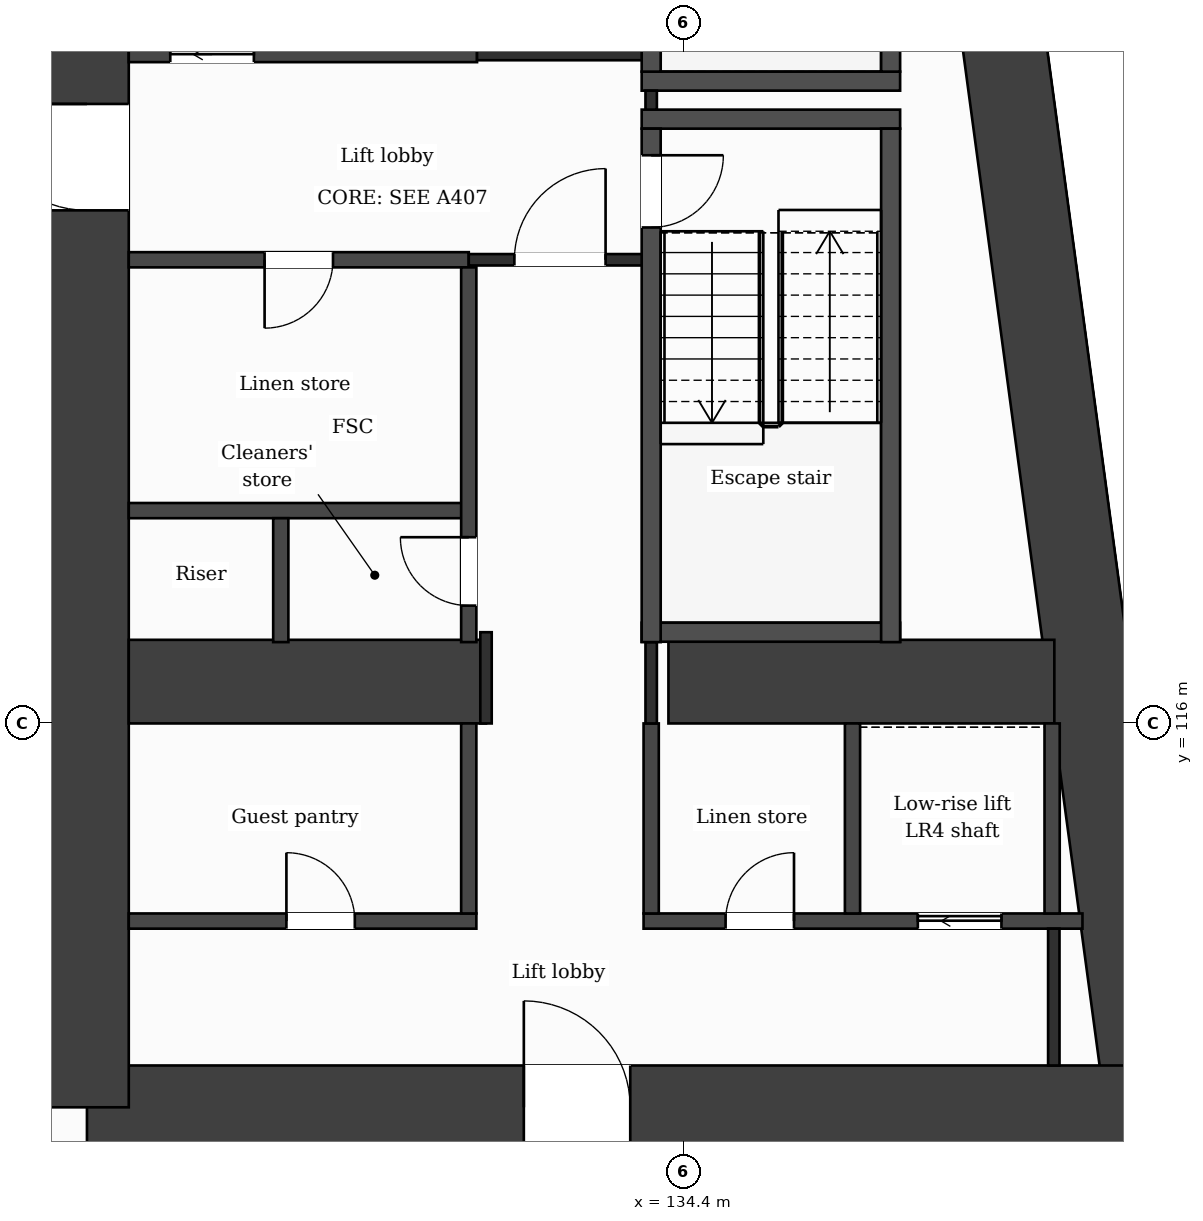
"""IFC4 building model, lengths in metres.
Left out: names, types, materials, properties, quantities, classifications, styles, units other than length and angle.
Written with IfcOpenShell. Run it as: python <this file> out.ifc"""

import sys

from ifc_helpers import new_model, si_unit, direction, frame, frame_2d, origin, place, context, subcontext, project, spatial, rectangle, extrude, element, fill, save


model = new_model("IFC4")
c1 = context("Model", 3, precision=1e-05, world=origin(), true_north=direction((0.0, 1.0)))
c2 = subcontext(c1, "Body", "Model", "MODEL_VIEW")
j1 = project(units=[si_unit("LENGTHUNIT", "METRE"), si_unit("PLANEANGLEUNIT", "RADIAN")], contexts=[c1])
p1 = place(None, origin())
s1 = spatial("IfcSite", under=j1, at=p1, CompositionType="ELEMENT")
p2 = place(p1, origin())
s2 = spatial("IfcBuilding", under=s1, at=p2, CompositionType="ELEMENT")
p3 = place(p2, frame((0.0, 0.0, 39.0)))
s3 = spatial("IfcBuildingStorey", under=s2, at=p3, CompositionType="ELEMENT", Elevation=39.0)
p4 = place(p3, frame((137.688, 131.85, 0.0), z_axis=(0.0, 0.0, 1.0), x_axis=(0.133411793472, -0.991060691059, 0.0)))
e1 = element("IfcWall", 1, at=p4, inside=s3, PredefinedType="SHEAR", context=c2, shape_type="SweptSolid", body=[
    extrude(rectangle(XDim=21.089, YDim=1.1, at=frame_2d((10.544, 0.0))), origin(), (0.0, 0.0, 1.0), 3.5),
])
p5 = place(p3, frame((140.502, 110.95, 0.0), z_axis=(0.0, 0.0, 1.0), x_axis=(-1.0, 0.0, 0.0)))
e2 = element("IfcWall", 2, at=p5, inside=s3, PredefinedType="SHEAR", context=c2, shape_type="SweptSolid", body=[
    extrude(rectangle(XDim=13.952, YDim=1.1, at=frame_2d((6.976, 0.0))), origin(), (0.0, 0.0, 1.0), 3.5),
])
p6 = place(p5, frame((6.804, 0.0, 0.0)))
e3 = element("IfcOpeningElement", 3, at=p6, cuts=e2, PredefinedType="OPENING", context=c2, shape_type="SweptSolid", body=[
    extrude(rectangle(XDim=1.4, YDim=2.1, at=frame_2d((0.7, 1.05))), frame((0.0, 0.56, 0.0), z_axis=(0.0, -1.0, 0.0), x_axis=(1.0, 0.0, 0.0)), (0.0, 0.0, 1.0), 1.12),
])
p7 = place(p3, frame((126.55, 110.95, 0.0), z_axis=(0.0, 0.0, 1.0), x_axis=(0.0, 1.0, 0.0)))
e4 = element("IfcWall", 4, at=p7, inside=s3, PredefinedType="SHEAR", context=c2, shape_type="SweptSolid", body=[
    extrude(rectangle(XDim=20.9, YDim=1.1, at=frame_2d((10.45, 0.0))), origin(), (0.0, 0.0, 1.0), 3.5),
])
p8 = place(p7, frame((11.8, 0.0, 0.0)))
e5 = element("IfcOpeningElement", 5, at=p8, cuts=e4, PredefinedType="OPENING", context=c2, shape_type="SweptSolid", body=[
    extrude(rectangle(XDim=1.4, YDim=2.1, at=frame_2d((0.7, 1.05))), frame((0.0, 0.56, 0.0), z_axis=(0.0, -1.0, 0.0), x_axis=(1.0, 0.0, 0.0)), (0.0, 0.0, 1.0), 1.12),
])
p9 = place(p3, frame((127.1, 116.55, 0.0), z_axis=(0.0, 0.0, 1.0), x_axis=(1.0, 0.0, 0.0)))
e6 = element("IfcWall", 6, at=p9, inside=s3, PredefinedType="SHEAR", context=c2, shape_type="SweptSolid", body=[
    extrude(rectangle(XDim=4.7, YDim=1.1, at=frame_2d((2.35, 0.0))), origin(), (0.0, 0.0, 1.0), 3.5),
])
p10 = place(p3, frame((134.2, 116.55, 0.0), z_axis=(0.0, 0.0, 1.0), x_axis=(1.0, 0.0, 0.0)))
e7 = element("IfcWall", 7, at=p10, inside=s3, PredefinedType="SHEAR", context=c2, shape_type="SweptSolid", body=[
    extrude(rectangle(XDim=5.077, YDim=1.1, at=frame_2d((2.539, 0.0))), origin(), (0.0, 0.0, 1.0), 3.5),
])
p11 = place(p3, frame((127.1, 113.4, 0.0), z_axis=(0.0, 0.0, 1.0), x_axis=(1.0, 0.0, 0.0)))
e8 = element("IfcWall", 8, at=p11, inside=s3, PredefinedType="PARTITIONING", context=c2, shape_type="SweptSolid", body=[
    extrude(rectangle(XDim=4.573, YDim=0.2, at=frame_2d((2.287, 0.0))), origin(), (0.0, 0.0, 1.0), 3.18),
])
p12 = place(p11, frame((2.074, 0.0, 0.0)))
e9 = element("IfcOpeningElement", 9, at=p12, cuts=e8, PredefinedType="OPENING", context=c2, shape_type="SweptSolid", body=[
    extrude(rectangle(XDim=0.9, YDim=2.1, at=frame_2d((0.45, 1.05))), frame((0.0, 0.11, 0.0), z_axis=(0.0, -1.0, 0.0), x_axis=(1.0, 0.0, 0.0)), (0.0, 0.0, 1.0), 0.22),
])
p13 = place(p3, frame((133.873, 113.4, 0.0), z_axis=(0.0, 0.0, 1.0), x_axis=(1.0, 0.0, 0.0)))
e10 = element("IfcWall", 10, at=p13, inside=s3, PredefinedType="PARTITIONING", context=c2, shape_type="SweptSolid", body=[
    extrude(rectangle(XDim=5.774, YDim=0.2, at=frame_2d((2.887, 0.0))), origin(), (0.0, 0.0, 1.0), 3.18),
])
p14 = place(p13, frame((3.608, 0.0, 0.0)))
e11 = element("IfcOpeningElement", 11, at=p14, cuts=e10, PredefinedType="OPENING", context=c2, shape_type="SweptSolid", body=[
    extrude(rectangle(XDim=1.1, YDim=2.1, at=frame_2d((0.55, 1.05))), frame((0.0, 0.11, 0.0), z_axis=(0.0, -1.0, 0.0), x_axis=(1.0, 0.0, 0.0)), (0.0, 0.0, 1.0), 0.22),
])
p15 = place(p13, frame((1.079, 0.0, 0.0)))
e12 = element("IfcOpeningElement", 12, at=p15, cuts=e10, PredefinedType="OPENING", context=c2, shape_type="SweptSolid", body=[
    extrude(rectangle(XDim=0.9, YDim=2.1, at=frame_2d((0.45, 1.05))), frame((0.0, 0.11, 0.0), z_axis=(0.0, -1.0, 0.0), x_axis=(1.0, 0.0, 0.0)), (0.0, 0.0, 1.0), 0.22),
])
p16 = place(p3, frame((133.848, 117.2, 0.0), z_axis=(0.0, 0.0, 1.0), x_axis=(1.0, 0.0, 0.0)))
e13 = element("IfcWall", 13, at=p16, inside=s3, PredefinedType="PARTITIONING", context=c2, shape_type="SweptSolid", body=[
    extrude(rectangle(XDim=3.4, YDim=0.25, at=frame_2d((1.7, 0.0))), origin(), (0.0, 0.0, 1.0), 3.18),
])
p17 = place(p3, frame((127.1, 118.8, 0.0), z_axis=(0.0, 0.0, 1.0), x_axis=(1.0, 0.0, 0.0)))
e14 = element("IfcWall", 14, at=p17, inside=s3, PredefinedType="PARTITIONING", context=c2, shape_type="SweptSolid", body=[
    extrude(rectangle(XDim=4.473, YDim=0.2, at=frame_2d((2.236, 0.0))), origin(), (0.0, 0.0, 1.0), 3.18),
])
p18 = place(p3, frame((127.1, 122.1, 0.0), z_axis=(0.0, 0.0, 1.0), x_axis=(1.0, 0.0, 0.0)))
e15 = element("IfcWall", 15, at=p18, inside=s3, PredefinedType="PARTITIONING", context=c2, shape_type="SweptSolid", body=[
    extrude(rectangle(XDim=4.473, YDim=0.2, at=frame_2d((2.236, 0.0))), origin(), (0.0, 0.0, 1.0), 3.18),
])
p19 = place(p18, frame((1.787, 0.0, 0.0)))
e16 = element("IfcOpeningElement", 16, at=p19, cuts=e15, PredefinedType="OPENING", context=c2, shape_type="SweptSolid", body=[
    extrude(rectangle(XDim=0.9, YDim=2.1, at=frame_2d((0.45, 1.05))), frame((0.0, 0.11, 0.0), z_axis=(0.0, -1.0, 0.0), x_axis=(1.0, 0.0, 0.0)), (0.0, 0.0, 1.0), 0.22),
])
p20 = place(p3, frame((131.573, 122.1, 0.0), z_axis=(0.0, 0.0, 1.0), x_axis=(1.0, 0.0, 0.0)))
e17 = element("IfcWall", 17, at=p20, inside=s3, PredefinedType="PARTITIONING", context=c2, shape_type="SweptSolid", body=[
    extrude(rectangle(XDim=2.4, YDim=0.15, at=frame_2d((1.2, 0.0))), origin(), (0.0, 0.0, 1.0), 3.18),
])
p21 = place(p20, frame((0.6, 0.0, 0.0)))
e18 = element("IfcOpeningElement", 18, at=p21, cuts=e17, PredefinedType="OPENING", context=c2, shape_type="SweptSolid", body=[
    extrude(rectangle(XDim=1.2, YDim=2.1, at=frame_2d((0.6, 1.05))), frame((0.0, 0.085, 0.0), z_axis=(0.0, -1.0, 0.0), x_axis=(1.0, 0.0, 0.0)), (0.0, 0.0, 1.0), 0.17),
])
for number, where, z_axis, x_axis in (
    (19, (133.848, 123.95, 0.0), (0.0, 0.0, 1.0), (1.0, 0.0, 0.0)),
    (20, (133.848, 124.45, 0.0), (0.0, 0.0, 1.0), (1.0, 0.0, 0.0)),
):
    element("IfcWall", number, at=place(p3, frame(where, z_axis=z_axis, x_axis=x_axis)), inside=s3, PredefinedType="PARTITIONING", context=c2, shape_type="SweptSolid", body=[
        extrude(rectangle(XDim=3.4, YDim=0.25, at=frame_2d((1.7, 0.0))), origin(), (0.0, 0.0, 1.0), 3.18),
    ])
p22 = place(p3, frame((127.1, 124.8, 0.0), z_axis=(0.0, 0.0, 1.0), x_axis=(1.0, 0.0, 0.0)))
e21 = element("IfcWall", 21, at=p22, inside=s3, PredefinedType="PARTITIONING", context=c2, shape_type="SweptSolid", body=[
    extrude(rectangle(XDim=4.582, YDim=0.2, at=frame_2d((2.291, 0.0))), origin(), (0.0, 0.0, 1.0), 3.18),
])
p23 = place(p22, frame((0.546, 0.0, 0.0)))
e22 = element("IfcOpeningElement", 22, at=p23, cuts=e21, PredefinedType="OPENING", context=c2, shape_type="SweptSolid", body=[
    extrude(rectangle(XDim=1.1, YDim=2.1, at=frame_2d((0.55, 1.05))), frame((0.0, 0.11, 0.0), z_axis=(0.0, -1.0, 0.0), x_axis=(1.0, 0.0, 0.0)), (0.0, 0.0, 1.0), 0.22),
])
p24 = place(p3, frame((131.682, 124.8, 0.0), z_axis=(0.0, 0.0, 1.0), x_axis=(1.0, 0.0, 0.0)))
e23 = element("IfcWall", 23, at=p24, inside=s3, PredefinedType="PARTITIONING", context=c2, shape_type="SweptSolid", body=[
    extrude(rectangle(XDim=2.416, YDim=0.15, at=frame_2d((1.208, 0.0))), origin(), (0.0, 0.0, 1.0), 3.18),
])
p25 = place(p3, frame((129.1, 117.07, 0.0), z_axis=(0.0, 0.0, 1.0), x_axis=(0.0, 1.0, 0.0)))
e24 = element("IfcWall", 24, at=p25, inside=s3, PredefinedType="PARTITIONING", context=c2, shape_type="SweptSolid", body=[
    extrude(rectangle(XDim=1.63, YDim=0.2, at=frame_2d((0.815, 0.0))), origin(), (0.0, 0.0, 1.0), 3.18),
])
p26 = place(p3, frame((131.573, 113.5, 0.0), z_axis=(0.0, 0.0, 1.0), x_axis=(0.0, 1.0, 0.0)))
e25 = element("IfcWall", 25, at=p26, inside=s3, PredefinedType="PARTITIONING", context=c2, shape_type="SweptSolid", body=[
    extrude(rectangle(XDim=2.5, YDim=0.2, at=frame_2d((1.25, 0.0))), origin(), (0.0, 0.0, 1.0), 3.18),
])
p27 = place(p3, frame((131.573, 117.07, 0.0), z_axis=(0.0, 0.0, 1.0), x_axis=(0.0, 1.0, 0.0)))
e26 = element("IfcWall", 26, at=p27, inside=s3, PredefinedType="PARTITIONING", context=c2, shape_type="SweptSolid", body=[
    extrude(rectangle(XDim=4.93, YDim=0.2, at=frame_2d((2.465, 0.0))), origin(), (0.0, 0.0, 1.0), 3.18),
])
p28 = place(p27, frame((0.48, 0.0, 0.0)))
e27 = element("IfcOpeningElement", 27, at=p28, cuts=e26, PredefinedType="OPENING", context=c2, shape_type="SweptSolid", body=[
    extrude(rectangle(XDim=0.9, YDim=2.1, at=frame_2d((0.45, 1.05))), frame((0.0, 0.11, 0.0), z_axis=(0.0, -1.0, 0.0), x_axis=(1.0, 0.0, 0.0)), (0.0, 0.0, 1.0), 0.22),
])
p29 = place(p3, frame((131.8, 116.0, 0.0), z_axis=(0.0, 0.0, 1.0), x_axis=(0.0, 1.0, 0.0)))
e28 = element("IfcWall", 28, at=p29, inside=s3, PredefinedType="PARTITIONING", context=c2, shape_type="SweptSolid", body=[
    extrude(rectangle(XDim=1.2, YDim=0.15, at=frame_2d((0.6, 0.0))), origin(), (0.0, 0.0, 1.0), 3.18),
])
p30 = place(p3, frame((133.973, 113.5, 0.0), z_axis=(0.0, 0.0, 1.0), x_axis=(0.0, 1.0, 0.0)))
e29 = element("IfcWall", 29, at=p30, inside=s3, PredefinedType="PARTITIONING", context=c2, shape_type="SweptSolid", body=[
    extrude(rectangle(XDim=2.5, YDim=0.2, at=frame_2d((1.25, 0.0))), origin(), (0.0, 0.0, 1.0), 3.18),
])
p31 = place(p3, frame((133.973, 116.0, 0.0), z_axis=(0.0, 0.0, 1.0), x_axis=(0.0, 1.0, 0.0)))
e30 = element("IfcWall", 30, at=p31, inside=s3, PredefinedType="PARTITIONING", context=c2, shape_type="SweptSolid", body=[
    extrude(rectangle(XDim=1.07, YDim=0.15, at=frame_2d((0.535, 0.0))), origin(), (0.0, 0.0, 1.0), 3.18),
])
p32 = place(p3, frame((133.973, 124.075, 0.0), z_axis=(0.0, 0.0, 1.0), x_axis=(0.0, 1.0, 0.0)))
e31 = element("IfcWall", 31, at=p32, inside=s3, PredefinedType="PARTITIONING", context=c2, shape_type="SweptSolid", body=[
    extrude(rectangle(XDim=0.25, YDim=0.15, at=frame_2d((0.125, 0.0))), origin(), (0.0, 0.0, 1.0), 3.18),
])
p33 = place(p3, frame((133.973, 117.07, 0.0), z_axis=(0.0, 0.0, 1.0), x_axis=(0.0, 1.0, 0.0)))
e32 = element("IfcWall", 32, at=p33, inside=s3, PredefinedType="PARTITIONING", context=c2, shape_type="SweptSolid", body=[
    extrude(rectangle(XDim=6.755, YDim=0.25, at=frame_2d((3.377, 0.0))), origin(), (0.0, 0.0, 1.0), 3.18),
])
p34 = place(p33, frame((5.455, 0.0, 0.0)))
e33 = element("IfcOpeningElement", 33, at=p34, cuts=e32, PredefinedType="OPENING", context=c2, shape_type="SweptSolid", body=[
    extrude(rectangle(XDim=0.95, YDim=2.1, at=frame_2d((0.475, 1.05))), frame((0.0, 0.135, 0.0), z_axis=(0.0, -1.0, 0.0), x_axis=(1.0, 0.0, 0.0)), (0.0, 0.0, 1.0), 0.27),
])
p35 = place(p3, frame((133.973, 124.575, 0.0), z_axis=(0.0, 0.0, 1.0), x_axis=(0.0, 1.0, 0.0)))
e34 = element("IfcWall", 34, at=p35, inside=s3, PredefinedType="PARTITIONING", context=c2, shape_type="SweptSolid", body=[
    extrude(rectangle(XDim=6.755, YDim=0.25, at=frame_2d((3.377, 0.0))), origin(), (0.0, 0.0, 1.0), 3.18),
])
p36 = place(p35, frame((5.325, 0.0, 0.0)))
e35 = element("IfcOpeningElement", 35, at=p36, cuts=e34, PredefinedType="OPENING", context=c2, shape_type="SweptSolid", body=[
    extrude(rectangle(XDim=1.0, YDim=2.1, at=frame_2d((0.5, 1.05))), frame((0.0, 0.135, 0.0), z_axis=(0.0, -1.0, 0.0), x_axis=(1.0, 0.0, 0.0)), (0.0, 0.0, 1.0), 0.27),
])
p37 = place(p3, frame((136.622, 113.5, 0.0), z_axis=(0.0, 0.0, 1.0), x_axis=(0.0, 1.0, 0.0)))
e36 = element("IfcWall", 36, at=p37, inside=s3, PredefinedType="PARTITIONING", context=c2, shape_type="SweptSolid", body=[
    extrude(rectangle(XDim=2.5, YDim=0.2, at=frame_2d((1.25, 0.0))), origin(), (0.0, 0.0, 1.0), 3.18),
])
p38 = place(p3, frame((137.123, 117.07, 0.0), z_axis=(0.0, 0.0, 1.0), x_axis=(0.0, 1.0, 0.0)))
e37 = element("IfcWall", 37, at=p38, inside=s3, PredefinedType="PARTITIONING", context=c2, shape_type="SweptSolid", body=[
    extrude(rectangle(XDim=6.755, YDim=0.25, at=frame_2d((3.377, 0.0))), origin(), (0.0, 0.0, 1.0), 3.18),
])
p39 = place(p3, frame((137.123, 124.575, 0.0), z_axis=(0.0, 0.0, 1.0), x_axis=(0.0, 1.0, 0.0)))
e38 = element("IfcWall", 38, at=p39, inside=s3, PredefinedType="PARTITIONING", context=c2, shape_type="SweptSolid", body=[
    extrude(rectangle(XDim=6.5, YDim=0.25, at=frame_2d((3.25, 0.0))), origin(), (0.0, 0.0, 1.0), 3.18),
])
p40 = place(p3, frame((139.248, 113.5, 0.0), z_axis=(0.0, 0.0, 1.0), x_axis=(0.0, 1.0, 0.0)))
e39 = element("IfcWall", 39, at=p40, inside=s3, PredefinedType="PARTITIONING", context=c2, shape_type="SweptSolid", body=[
    extrude(rectangle(XDim=2.5, YDim=0.2, at=frame_2d((1.25, 0.0))), origin(), (0.0, 0.0, 1.0), 3.18),
])
p41 = place(p3, frame((139.27, 111.5, 0.0), z_axis=(0.0, 0.0, 1.0), x_axis=(0.0, 1.0, 0.0)))
e40 = element("IfcWall", 40, at=p41, inside=s3, PredefinedType="PARTITIONING", context=c2, shape_type="SweptSolid", body=[
    extrude(rectangle(XDim=1.8, YDim=0.15, at=frame_2d((0.9, 0.0))), origin(), (0.0, 0.0, 1.0), 3.18),
])
p42 = place(p21, origin())
e41 = element("IfcDoor", 41, at=p42, inside=s3, OperationType="SINGLE_SWING_RIGHT", PredefinedType="DOOR", context=c2, shape_type="SweptSolid", body=[
    extrude(rectangle(XDim=1.2, YDim=2.1, at=frame_2d((0.6, 1.05))), frame((0.0, 0.025, 0.0), z_axis=(0.0, -1.0, 0.0), x_axis=(1.0, 0.0, 0.0)), (0.0, 0.0, 1.0), 0.05),
])
fill(e18, e41)
p43 = place(p23, origin())
e42 = element("IfcDoor", 42, at=p43, inside=s3, OperationType="SLIDING_TO_LEFT", PredefinedType="DOOR", context=c2, shape_type="SweptSolid", body=[
    extrude(rectangle(XDim=1.1, YDim=2.1, at=frame_2d((0.55, 1.05))), frame((0.0, 0.025, 0.0), z_axis=(0.0, -1.0, 0.0), x_axis=(1.0, 0.0, 0.0)), (0.0, 0.0, 1.0), 0.05),
])
fill(e22, e42)
p44 = place(p19, origin())
e43 = element("IfcDoor", 43, at=p44, inside=s3, OperationType="SINGLE_SWING_LEFT", PredefinedType="DOOR", context=c2, shape_type="SweptSolid", body=[
    extrude(rectangle(XDim=0.9, YDim=2.1, at=frame_2d((0.45, 1.05))), frame((0.0, 0.025, 0.0), z_axis=(0.0, -1.0, 0.0), x_axis=(1.0, 0.0, 0.0)), (0.0, 0.0, 1.0), 0.05),
])
fill(e16, e43)
p45 = place(p34, origin())
e44 = element("IfcDoor", 44, at=p45, inside=s3, OperationType="SINGLE_SWING_RIGHT", PredefinedType="DOOR", context=c2, shape_type="SweptSolid", body=[
    extrude(rectangle(XDim=0.95, YDim=2.1, at=frame_2d((0.475, 1.05))), frame((0.0, 0.025, 0.0), z_axis=(0.0, -1.0, 0.0), x_axis=(1.0, 0.0, 0.0)), (0.0, 0.0, 1.0), 0.05),
])
fill(e33, e44)
p46 = place(p28, origin())
e45 = element("IfcDoor", 45, at=p46, inside=s3, OperationType="SINGLE_SWING_RIGHT", PredefinedType="DOOR", context=c2, shape_type="SweptSolid", body=[
    extrude(rectangle(XDim=0.9, YDim=2.1, at=frame_2d((0.45, 1.05))), frame((0.0, 0.025, 0.0), z_axis=(0.0, -1.0, 0.0), x_axis=(1.0, 0.0, 0.0)), (0.0, 0.0, 1.0), 0.05),
])
fill(e27, e45)
p47 = place(p14, origin())
e46 = element("IfcDoor", 46, at=p47, inside=s3, OperationType="SLIDING_TO_LEFT", PredefinedType="DOOR", context=c2, shape_type="SweptSolid", body=[
    extrude(rectangle(XDim=1.1, YDim=2.1, at=frame_2d((0.55, 1.05))), frame((0.0, 0.025, 0.0), z_axis=(0.0, -1.0, 0.0), x_axis=(1.0, 0.0, 0.0)), (0.0, 0.0, 1.0), 0.05),
])
fill(e11, e46)
p48 = place(p15, origin())
e47 = element("IfcDoor", 47, at=p48, inside=s3, OperationType="SINGLE_SWING_RIGHT", PredefinedType="DOOR", context=c2, shape_type="SweptSolid", body=[
    extrude(rectangle(XDim=0.9, YDim=2.1, at=frame_2d((0.45, 1.05))), frame((0.0, 0.025, 0.0), z_axis=(0.0, -1.0, 0.0), x_axis=(1.0, 0.0, 0.0)), (0.0, 0.0, 1.0), 0.05),
])
fill(e12, e47)
p49 = place(p12, origin())
e48 = element("IfcDoor", 48, at=p49, inside=s3, OperationType="SINGLE_SWING_LEFT", PredefinedType="DOOR", context=c2, shape_type="SweptSolid", body=[
    extrude(rectangle(XDim=0.9, YDim=2.1, at=frame_2d((0.45, 1.05))), frame((0.0, 0.025, 0.0), z_axis=(0.0, -1.0, 0.0), x_axis=(1.0, 0.0, 0.0)), (0.0, 0.0, 1.0), 0.05),
])
fill(e9, e48)
p50 = place(p6, origin())
e49 = element("IfcDoor", 49, at=p50, inside=s3, OperationType="SINGLE_SWING_RIGHT", PredefinedType="DOOR", context=c2, shape_type="SweptSolid", body=[
    extrude(rectangle(XDim=1.4, YDim=2.1, at=frame_2d((0.7, 1.05))), frame((0.0, 0.025, 0.0), z_axis=(0.0, -1.0, 0.0), x_axis=(1.0, 0.0, 0.0)), (0.0, 0.0, 1.0), 0.05),
])
fill(e3, e49)
p51 = place(p8, origin())
e50 = element("IfcDoor", 50, at=p51, inside=s3, OperationType="SINGLE_SWING_RIGHT", PredefinedType="DOOR", context=c2, shape_type="SweptSolid", body=[
    extrude(rectangle(XDim=1.4, YDim=2.1, at=frame_2d((0.7, 1.05))), frame((0.0, 0.025, 0.0), z_axis=(0.0, -1.0, 0.0), x_axis=(1.0, 0.0, 0.0)), (0.0, 0.0, 1.0), 0.05),
])
fill(e5, e50)
save(model, sys.argv[1])
